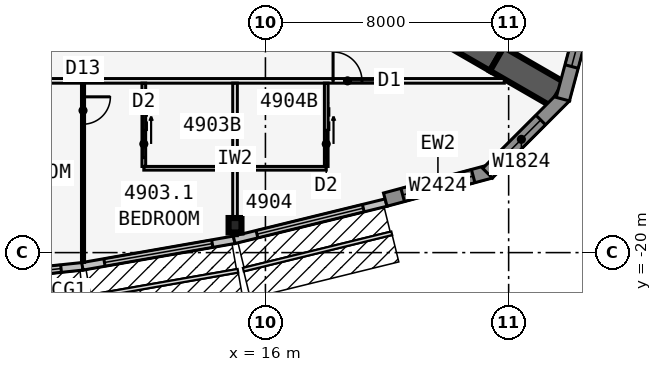
"""IFC4 building model, lengths in metres.
Left out: names, types, materials, properties, quantities, classifications, styles, units other than length and angle.
Written with IfcOpenShell. Run it as: python <this file> out.ifc"""

import sys

from ifc_helpers import new_model, si_unit, direction, frame, frame_2d, origin, origin_2d, place, context, subcontext, project, spatial, polyline, rectangle, i_section, outline, extrude, element, fill, save


model = new_model("IFC4")
c1 = context("Model", 3, precision=1e-05, world=origin(), true_north=direction((0.0, 1.0)))
c2 = subcontext(c1, "Body", "Model", "MODEL_VIEW")
j1 = project(units=[si_unit("LENGTHUNIT", "METRE"), si_unit("PLANEANGLEUNIT", "RADIAN")], contexts=[c1])
p1 = place(None, origin())
s1 = spatial("IfcSite", under=j1, at=p1, CompositionType="ELEMENT")
p2 = place(p1, origin())
s2 = spatial("IfcBuilding", under=s1, at=p2, CompositionType="ELEMENT")
p3 = place(p2, frame((0.0, 0.0, 182.7)))
s3 = spatial("IfcBuildingStorey", under=s2, at=p3, CompositionType="ELEMENT", Elevation=182.7)
for number, where, z_axis, x_axis in (
    (1, (21.61, -12.477, 0.0), (0.0, 0.0, 1.0), (0.866, -0.5, 0.0)),
    (2, (23.61, -13.631, 0.0), (0.0, 0.0, 1.0), (0.866, -0.5, 0.0)),
):
    element("IfcWall", number, at=place(p3, frame(where, z_axis=z_axis, x_axis=x_axis)), inside=s3, PredefinedType="SHEAR", context=c2, shape_type="SweptSolid", body=[
        extrude(rectangle(XDim=2.309, YDim=0.9, at=frame_2d((1.155, 0.0))), origin(), (0.0, 0.0, 1.0), 3.4),
    ])
p4 = place(p3, frame((15.0, -19.1, 0.0), z_axis=(0.0, 0.0, 1.0), x_axis=(1.0, 0.0, 0.0)))
e3 = element("IfcColumn", 3, at=p4, inside=s3, PredefinedType="COLUMN", context=c2, shape_type="SweptSolid", body=[
    extrude(i_section(OverallWidth=0.424, OverallDepth=0.475, WebThickness=0.048, FlangeThickness=0.077, at=origin_2d()), origin(), (0.0, 0.0, 1.0), 3.4),
])
p5 = place(p3, frame((4.987, -20.976, 0.0), z_axis=(0.0, 0.0, 1.0), x_axis=(0.994534683851, 0.104406717299, 0.0)))
e4 = element("IfcWall", 4, at=p5, inside=s3, PredefinedType="STANDARD", context=c2, shape_type="SweptSolid", body=[
    extrude(rectangle(XDim=5.028, YDim=0.25, at=frame_2d((2.514, 0.0))), origin(), (0.0, 0.0, 1.0), 3.235),
])
p6 = place(p5, frame((0.714, 0.0, 0.45)))
e5 = element("IfcOpeningElement", 5, at=p6, cuts=e4, PredefinedType="OPENING", context=c2, shape_type="SweptSolid", body=[
    extrude(rectangle(XDim=3.6, YDim=2.4, at=frame_2d((1.8, 1.2))), frame((0.0, 0.135, 0.0), z_axis=(0.0, -1.0, 0.0), x_axis=(1.0, 0.0, 0.0)), (0.0, 0.0, 1.0), 0.27),
])
p7 = place(p3, frame((9.979, -20.452, 0.0), z_axis=(0.0, 0.0, 1.0), x_axis=(0.985030467156, 0.172380331752, 0.0)))
e6 = element("IfcWall", 6, at=p7, inside=s3, PredefinedType="STANDARD", context=c2, shape_type="SweptSolid", body=[
    extrude(rectangle(XDim=5.076, YDim=0.25, at=frame_2d((2.538, 0.0))), origin(), (0.0, 0.0, 1.0), 3.235),
])
p8 = place(p7, frame((0.738, 0.0, 0.45)))
e7 = element("IfcOpeningElement", 7, at=p8, cuts=e6, PredefinedType="OPENING", context=c2, shape_type="SweptSolid", body=[
    extrude(rectangle(XDim=3.6, YDim=2.4, at=frame_2d((1.8, 1.2))), frame((0.0, 0.135, 0.0), z_axis=(0.0, -1.0, 0.0), x_axis=(1.0, 0.0, 0.0)), (0.0, 0.0, 1.0), 0.27),
])
p9 = place(p3, frame((14.97, -19.579, 0.0), z_axis=(0.0, 0.0, 1.0), x_axis=(0.971270024053, 0.237980126011, 0.0)))
e8 = element("IfcWall", 8, at=p9, inside=s3, PredefinedType="STANDARD", context=c2, shape_type="SweptSolid", body=[
    extrude(rectangle(XDim=5.148, YDim=0.25, at=frame_2d((2.574, 0.0))), origin(), (0.0, 0.0, 1.0), 3.235),
])
p10 = place(p9, frame((0.774, 0.0, 0.45)))
e9 = element("IfcOpeningElement", 9, at=p10, cuts=e8, PredefinedType="OPENING", context=c2, shape_type="SweptSolid", body=[
    extrude(rectangle(XDim=3.6, YDim=2.4, at=frame_2d((1.8, 1.2))), frame((0.0, 0.135, 0.0), z_axis=(0.0, -1.0, 0.0), x_axis=(1.0, 0.0, 0.0)), (0.0, 0.0, 1.0), 0.27),
])
p11 = place(p3, frame((19.942, -18.258, 0.0), z_axis=(0.0, 0.0, 1.0), x_axis=(0.965924653531, 0.258823421857, 0.0)))
e10 = element("IfcWall", 10, at=p11, inside=s3, PredefinedType="SOLIDWALL", context=c2, shape_type="SweptSolid", body=[
    extrude(rectangle(XDim=3.586, YDim=0.45, at=frame_2d((1.793, 0.0))), origin(), (0.0, 0.0, 1.0), 3.235),
])
p12 = place(p11, frame((0.593, 0.0, 0.45)))
e11 = element("IfcOpeningElement", 11, at=p12, cuts=e10, PredefinedType="OPENING", context=c2, shape_type="SweptSolid", body=[
    extrude(rectangle(XDim=2.4, YDim=2.4, at=frame_2d((1.2, 1.2))), frame((0.0, 0.235, 0.0), z_axis=(0.0, -1.0, 0.0), x_axis=(1.0, 0.0, 0.0)), (0.0, 0.0, 1.0), 0.47),
])
p13 = place(p3, frame((23.305, -17.388, 0.0), z_axis=(0.0, 0.0, 1.0), x_axis=(0.707106781187, 0.707106781187, 0.0)))
e12 = element("IfcWall", 12, at=p13, inside=s3, PredefinedType="SOLIDWALL", context=c2, shape_type="SweptSolid", body=[
    extrude(outline(polyline([(3.586, 0.225), (3.527, 0.225), (3.035, 0.093), (3.0, 0.225), (0.0, 0.225), (0.0, -0.225), (3.586, -0.225), (3.586, 0.225)])), origin(), (0.0, 0.0, 1.0), 3.235),
])
p14 = place(p13, frame((0.675, 0.0, 0.45)))
e13 = element("IfcOpeningElement", 13, at=p14, cuts=e12, PredefinedType="OPENING", context=c2, shape_type="SweptSolid", body=[
    extrude(rectangle(XDim=1.8, YDim=2.4, at=frame_2d((0.9, 1.2))), frame((0.0, 0.235, 0.0), z_axis=(0.0, -1.0, 0.0), x_axis=(1.0, 0.0, 0.0)), (0.0, 0.0, 1.0), 0.47),
])
p15 = place(p3, frame((25.783, -14.953, 0.0), z_axis=(0.0, 0.0, 1.0), x_axis=(0.258823421857, 0.965924653531, 0.0)))
e14 = element("IfcWall", 14, at=p15, inside=s3, PredefinedType="SOLIDWALL", context=c2, shape_type="SweptSolid", body=[
    extrude(outline(polyline([(3.586, 0.225), (0.586, 0.225), (0.551, 0.093), (0.06, 0.225), (0.0, 0.225), (0.0, -0.225), (3.586, -0.225), (3.586, 0.225)])), origin(), (0.0, 0.0, 1.0), 3.235),
])
p16 = place(p15, frame((1.111, 0.0, 0.45)))
e15 = element("IfcOpeningElement", 15, at=p16, cuts=e14, PredefinedType="OPENING", context=c2, shape_type="SweptSolid", body=[
    extrude(rectangle(XDim=1.8, YDim=2.4, at=frame_2d((0.9, 1.2))), frame((0.0, 0.235, 0.0), z_axis=(0.0, -1.0, 0.0), x_axis=(1.0, 0.0, 0.0)), (0.0, 0.0, 1.0), 0.47),
])
p17 = place(p3, frame((-23.857, -14.351, 0.0), z_axis=(0.0, 0.0, 1.0), x_axis=(1.0, 0.0, 0.0)))
e16 = element("IfcWall", 16, at=p17, inside=s3, PredefinedType="PARTITIONING", context=c2, shape_type="SweptSolid", body=[
    extrude(rectangle(XDim=47.714, YDim=0.15, at=frame_2d((23.857, 0.0))), origin(), (0.0, 0.0, 1.0), 3.235),
])
p18 = place(p17, frame((3.723, 0.0, 0.0)))
e17 = element("IfcOpeningElement", 17, at=p18, cuts=e16, PredefinedType="OPENING", context=c2, shape_type="SweptSolid", body=[
    extrude(rectangle(XDim=0.95, YDim=2.13, at=frame_2d((0.475, 1.065))), frame((0.0, 0.085, 0.0), z_axis=(0.0, -1.0, 0.0), x_axis=(1.0, 0.0, 0.0)), (0.0, 0.0, 1.0), 0.17),
])
p19 = place(p17, frame((17.082, 0.0, 0.0)))
e18 = element("IfcOpeningElement", 18, at=p19, cuts=e16, PredefinedType="OPENING", context=c2, shape_type="SweptSolid", body=[
    extrude(rectangle(XDim=0.95, YDim=2.13, at=frame_2d((0.475, 1.065))), frame((0.0, 0.085, 0.0), z_axis=(0.0, -1.0, 0.0), x_axis=(1.0, 0.0, 0.0)), (0.0, 0.0, 1.0), 0.17),
])
p20 = place(p17, frame((25.857, 0.0, 0.0)))
e19 = element("IfcOpeningElement", 19, at=p20, cuts=e16, PredefinedType="OPENING", context=c2, shape_type="SweptSolid", body=[
    extrude(rectangle(XDim=1.0, YDim=2.13, at=frame_2d((0.5, 1.065))), frame((0.0, 0.085, 0.0), z_axis=(0.0, -1.0, 0.0), x_axis=(1.0, 0.0, 0.0)), (0.0, 0.0, 1.0), 0.17),
])
p21 = place(p17, frame((30.882, 0.0, 0.0)))
e20 = element("IfcOpeningElement", 20, at=p21, cuts=e16, PredefinedType="OPENING", context=c2, shape_type="SweptSolid", body=[
    extrude(rectangle(XDim=0.95, YDim=2.13, at=frame_2d((0.475, 1.065))), frame((0.0, 0.085, 0.0), z_axis=(0.0, -1.0, 0.0), x_axis=(1.0, 0.0, 0.0)), (0.0, 0.0, 1.0), 0.17),
])
p22 = place(p17, frame((42.082, 0.0, 0.0)))
e21 = element("IfcOpeningElement", 21, at=p22, cuts=e16, PredefinedType="OPENING", context=c2, shape_type="SweptSolid", body=[
    extrude(rectangle(XDim=0.95, YDim=2.13, at=frame_2d((0.475, 1.065))), frame((0.0, 0.085, 0.0), z_axis=(0.0, -1.0, 0.0), x_axis=(1.0, 0.0, 0.0)), (0.0, 0.0, 1.0), 0.17),
])
p23 = place(p3, frame((10.0, -14.426, 0.0), z_axis=(0.0, 0.0, 1.0), x_axis=(0.0, -1.0, 0.0)))
e22 = element("IfcWall", 22, at=p23, inside=s3, PredefinedType="PARTITIONING", context=c2, shape_type="SweptSolid", body=[
    extrude(rectangle(XDim=5.895, YDim=0.1, at=frame_2d((2.948, 0.0))), origin(), (0.0, 0.0, 1.0), 2.389),
])
p24 = place(p23, frame((0.45, 0.0, 0.0)))
e23 = element("IfcOpeningElement", 23, at=p24, cuts=e22, PredefinedType="OPENING", context=c2, shape_type="SweptSolid", body=[
    extrude(rectangle(XDim=0.9, YDim=2.13, at=frame_2d((0.45, 1.065))), frame((0.0, 0.06, 0.0), z_axis=(0.0, -1.0, 0.0), x_axis=(1.0, 0.0, 0.0)), (0.0, 0.0, 1.0), 0.12),
])
p25 = place(p3, frame((15.0, -14.426, 0.0), z_axis=(0.0, 0.0, 1.0), x_axis=(0.0, -1.0, 0.0)))
e24 = element("IfcWall", 24, at=p25, inside=s3, PredefinedType="PARTITIONING", context=c2, shape_type="SweptSolid", body=[
    extrude(rectangle(XDim=5.017, YDim=0.15, at=frame_2d((2.508, 0.0))), origin(), (0.0, 0.0, 1.0), 2.389),
])
p26 = place(p3, frame((12.0, -17.226, 0.0), z_axis=(0.0, 0.0, 1.0), x_axis=(1.0, 0.0, 0.0)))
e25 = element("IfcWall", 25, at=p26, inside=s3, PredefinedType="PLUMBINGWALL", context=c2, shape_type="SweptSolid", body=[
    extrude(rectangle(XDim=3.0, YDim=0.12, at=frame_2d((1.5, 0.0))), origin(), (0.0, 0.0, 1.0), 3.235),
])
p27 = place(p3, frame((12.0, -14.426, 0.0), z_axis=(0.0, 0.0, 1.0), x_axis=(0.0, -1.0, 0.0)))
e26 = element("IfcWall", 26, at=p27, inside=s3, PredefinedType="PLUMBINGWALL", context=c2, shape_type="SweptSolid", body=[
    extrude(rectangle(XDim=2.74, YDim=0.12, at=frame_2d((1.37, 0.0))), origin(), (0.0, 0.0, 1.0), 3.235),
])
p28 = place(p27, frame((1.55, 0.0, 0.0)))
e27 = element("IfcOpeningElement", 27, at=p28, cuts=e26, PredefinedType="OPENING", context=c2, shape_type="SweptSolid", body=[
    extrude(rectangle(XDim=0.9, YDim=2.13, at=frame_2d((0.45, 1.065))), frame((0.0, 0.07, 0.0), z_axis=(0.0, -1.0, 0.0), x_axis=(1.0, 0.0, 0.0)), (0.0, 0.0, 1.0), 0.14),
])
p29 = place(p3, frame((15.0, -17.226, 0.0), z_axis=(0.0, 0.0, 1.0), x_axis=(1.0, 0.0, 0.0)))
e28 = element("IfcWall", 28, at=p29, inside=s3, PredefinedType="PLUMBINGWALL", context=c2, shape_type="SweptSolid", body=[
    extrude(rectangle(XDim=3.0, YDim=0.12, at=frame_2d((1.5, 0.0))), origin(), (0.0, 0.0, 1.0), 3.235),
])
p30 = place(p3, frame((18.0, -14.426, 0.0), z_axis=(0.0, 0.0, 1.0), x_axis=(0.0, -1.0, 0.0)))
e29 = element("IfcWall", 29, at=p30, inside=s3, PredefinedType="PLUMBINGWALL", context=c2, shape_type="SweptSolid", body=[
    extrude(rectangle(XDim=2.74, YDim=0.12, at=frame_2d((1.37, 0.0))), origin(), (0.0, 0.0, 1.0), 3.235),
])
p31 = place(p30, frame((1.55, 0.0, 0.0)))
e30 = element("IfcOpeningElement", 30, at=p31, cuts=e29, PredefinedType="OPENING", context=c2, shape_type="SweptSolid", body=[
    extrude(rectangle(XDim=0.9, YDim=2.13, at=frame_2d((0.45, 1.065))), frame((0.0, 0.07, 0.0), z_axis=(0.0, -1.0, 0.0), x_axis=(1.0, 0.0, 0.0)), (0.0, 0.0, 1.0), 0.14),
])
p32 = place(p6, origin())
e31 = element("IfcWindow", 31, at=p32, inside=s3, PartitioningType="SINGLE_PANEL", PredefinedType="WINDOW", context=c2, shape_type="SweptSolid", body=[
    extrude(rectangle(XDim=3.6, YDim=2.4, at=frame_2d((1.8, 1.2))), frame((0.0, 0.03, 0.0), z_axis=(0.0, -1.0, 0.0), x_axis=(1.0, 0.0, 0.0)), (0.0, 0.0, 1.0), 0.06),
])
fill(e5, e31)
p33 = place(p8, origin())
e32 = element("IfcWindow", 32, at=p33, inside=s3, PartitioningType="SINGLE_PANEL", PredefinedType="WINDOW", context=c2, shape_type="SweptSolid", body=[
    extrude(rectangle(XDim=3.6, YDim=2.4, at=frame_2d((1.8, 1.2))), frame((0.0, 0.03, 0.0), z_axis=(0.0, -1.0, 0.0), x_axis=(1.0, 0.0, 0.0)), (0.0, 0.0, 1.0), 0.06),
])
fill(e7, e32)
p34 = place(p10, origin())
e33 = element("IfcWindow", 33, at=p34, inside=s3, PartitioningType="SINGLE_PANEL", PredefinedType="WINDOW", context=c2, shape_type="SweptSolid", body=[
    extrude(rectangle(XDim=3.6, YDim=2.4, at=frame_2d((1.8, 1.2))), frame((0.0, 0.03, 0.0), z_axis=(0.0, -1.0, 0.0), x_axis=(1.0, 0.0, 0.0)), (0.0, 0.0, 1.0), 0.06),
])
fill(e9, e33)
p35 = place(p12, origin())
e34 = element("IfcWindow", 34, at=p35, inside=s3, PartitioningType="SINGLE_PANEL", PredefinedType="WINDOW", context=c2, shape_type="SweptSolid", body=[
    extrude(rectangle(XDim=2.4, YDim=2.4, at=frame_2d((1.2, 1.2))), frame((0.0, 0.03, 0.0), z_axis=(0.0, -1.0, 0.0), x_axis=(1.0, 0.0, 0.0)), (0.0, 0.0, 1.0), 0.06),
])
fill(e11, e34)
p36 = place(p14, origin())
e35 = element("IfcWindow", 35, at=p36, inside=s3, PartitioningType="SINGLE_PANEL", PredefinedType="WINDOW", context=c2, shape_type="SweptSolid", body=[
    extrude(rectangle(XDim=1.8, YDim=2.4, at=frame_2d((0.9, 1.2))), frame((0.0, 0.03, 0.0), z_axis=(0.0, -1.0, 0.0), x_axis=(1.0, 0.0, 0.0)), (0.0, 0.0, 1.0), 0.06),
])
fill(e13, e35)
p37 = place(p16, origin())
e36 = element("IfcWindow", 36, at=p37, inside=s3, PartitioningType="SINGLE_PANEL", PredefinedType="WINDOW", context=c2, shape_type="SweptSolid", body=[
    extrude(rectangle(XDim=1.8, YDim=2.4, at=frame_2d((0.9, 1.2))), frame((0.0, 0.03, 0.0), z_axis=(0.0, -1.0, 0.0), x_axis=(1.0, 0.0, 0.0)), (0.0, 0.0, 1.0), 0.06),
])
fill(e15, e36)
p38 = place(p24, origin())
e37 = element("IfcDoor", 37, at=p38, inside=s3, OperationType="SINGLE_SWING_LEFT", PredefinedType="DOOR", context=c2, shape_type="SweptSolid", body=[
    extrude(rectangle(XDim=0.9, YDim=2.13, at=frame_2d((0.45, 1.065))), frame((0.0, 0.025, 0.0), z_axis=(0.0, -1.0, 0.0), x_axis=(1.0, 0.0, 0.0)), (0.0, 0.0, 1.0), 0.05),
])
fill(e23, e37)
p39 = place(p28, origin())
e38 = element("IfcDoor", 38, at=p39, inside=s3, OperationType="SLIDING_TO_LEFT", PredefinedType="DOOR", context=c2, shape_type="SweptSolid", body=[
    extrude(rectangle(XDim=0.9, YDim=2.13, at=frame_2d((0.45, 1.065))), frame((0.0, 0.025, 0.0), z_axis=(0.0, -1.0, 0.0), x_axis=(1.0, 0.0, 0.0)), (0.0, 0.0, 1.0), 0.05),
])
fill(e27, e38)
p40 = place(p31, origin())
e39 = element("IfcDoor", 39, at=p40, inside=s3, OperationType="SLIDING_TO_LEFT", PredefinedType="DOOR", context=c2, shape_type="SweptSolid", body=[
    extrude(rectangle(XDim=0.9, YDim=2.13, at=frame_2d((0.45, 1.065))), frame((0.0, 0.025, 0.0), z_axis=(0.0, -1.0, 0.0), x_axis=(1.0, 0.0, 0.0)), (0.0, 0.0, 1.0), 0.05),
])
fill(e30, e39)
p41 = place(p22, origin())
e40 = element("IfcDoor", 40, at=p41, inside=s3, OperationType="SINGLE_SWING_LEFT", PredefinedType="DOOR", context=c2, shape_type="SweptSolid", body=[
    extrude(rectangle(XDim=0.95, YDim=2.13, at=frame_2d((0.475, 1.065))), frame((0.0, 0.025, 0.0), z_axis=(0.0, -1.0, 0.0), x_axis=(1.0, 0.0, 0.0)), (0.0, 0.0, 1.0), 0.05),
])
fill(e21, e40)
save(model, sys.argv[1])
